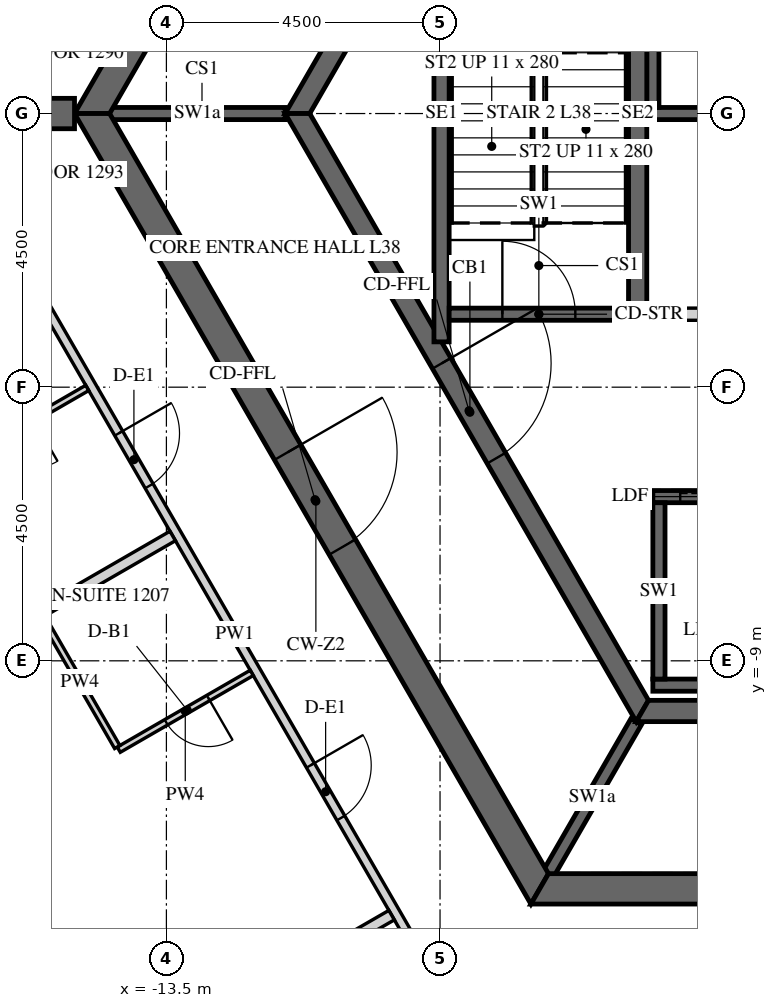
"""IFC4 building model, lengths in metres.
Left out: names, types, materials, properties, quantities, classifications, styles, units other than length and angle.
Written with IfcOpenShell. Run it as: python <this file> out.ifc"""

import sys

from ifc_helpers import new_model, si_unit, direction, frame, frame_2d, origin, place, context, subcontext, project, spatial, polyline, rectangle, outline, extrude, element, fill, save


model = new_model("IFC4")
c1 = context("Model", 3, precision=1e-05, world=origin(), true_north=direction((0.0, 1.0)))
c2 = subcontext(c1, "Body", "Model", "MODEL_VIEW")
j1 = project(units=[si_unit("LENGTHUNIT", "METRE"), si_unit("PLANEANGLEUNIT", "RADIAN")], contexts=[c1])
p1 = place(None, origin())
s1 = spatial("IfcSite", under=j1, at=p1, CompositionType="ELEMENT")
p2 = place(p1, origin())
s2 = spatial("IfcBuilding", under=s1, at=p2, CompositionType="ELEMENT")
p3 = place(p2, frame((0.0, 0.0, 164.4)))
s3 = spatial("IfcBuildingStorey", under=s2, at=p3, CompositionType="ELEMENT", Elevation=164.4)
p4 = place(p3, frame((-7.361, 12.75, -0.15), z_axis=(0.0, 0.0, 1.0), x_axis=(-0.50000571537, -0.866022103989, 0.0)))
e1 = element("IfcWall", 1, at=p4, inside=s3, PredefinedType="SHEAR", context=c2, shape_type="SweptSolid", body=[
    extrude(outline(polyline([(-0.144, -0.25), (14.867, -0.25), (14.578, 0.25), (0.144, 0.25), (-0.144, -0.25)])), origin(), (0.0, 0.0, 1.0), 3.9),
])
p5 = place(p4, frame((6.49, 0.0, 0.15)))
e2 = element("IfcOpeningElement", 2, at=p5, cuts=e1, PredefinedType="OPENING", context=c2, shape_type="SweptSolid", body=[
    extrude(rectangle(XDim=1.8, YDim=2.4, at=frame_2d((0.9, 1.2))), frame((0.0, 0.26, 0.0), z_axis=(0.0, -1.0, 0.0), x_axis=(1.0, 0.0, 0.0)), (0.0, 0.0, 1.0), 0.52),
])
p6 = place(p3, frame((-14.722, 0.0, -0.15), z_axis=(0.0, 0.0, 1.0), x_axis=(0.50000571537, -0.866022103989, 0.0)))
e3 = element("IfcWall", 3, at=p6, inside=s3, PredefinedType="SHEAR", context=c2, shape_type="SweptSolid", body=[
    extrude(outline(polyline([(-0.144, -0.25), (14.867, -0.25), (14.578, 0.25), (0.144, 0.25), (-0.144, -0.25)])), origin(), (0.0, 0.0, 1.0), 3.9),
])
p7 = place(p6, frame((6.432, 0.0, 0.15)))
e4 = element("IfcOpeningElement", 4, at=p7, cuts=e3, PredefinedType="OPENING", context=c2, shape_type="SweptSolid", body=[
    extrude(rectangle(XDim=1.8, YDim=2.4, at=frame_2d((0.9, 1.2))), frame((0.0, 0.26, 0.0), z_axis=(0.0, -1.0, 0.0), x_axis=(1.0, 0.0, 0.0)), (0.0, 0.0, 1.0), 0.52),
])
p8 = place(p3, frame((-7.361, -12.75, -0.15), z_axis=(0.0, 0.0, 1.0), x_axis=(1.0, 0.0, 0.0)))
e5 = element("IfcWall", 5, at=p8, inside=s3, PredefinedType="SHEAR", context=c2, shape_type="SweptSolid", body=[
    extrude(outline(polyline([(-0.144, -0.25), (14.866, -0.25), (14.578, 0.25), (0.144, 0.25), (-0.144, -0.25)])), origin(), (0.0, 0.0, 1.0), 3.9),
])
p9 = place(p8, frame((6.761, 0.0, 0.15)))
e6 = element("IfcOpeningElement", 6, at=p9, cuts=e5, PredefinedType="OPENING", context=c2, shape_type="SweptSolid", body=[
    extrude(rectangle(XDim=1.2, YDim=2.4, at=frame_2d((0.6, 1.2))), frame((0.0, 0.26, 0.0), z_axis=(0.0, -1.0, 0.0), x_axis=(1.0, 0.0, 0.0)), (0.0, 0.0, 1.0), 0.52),
])
p10 = place(p3, frame((-15.011, 0.0, -0.15), z_axis=(0.0, 0.0, 1.0), x_axis=(-1.0, 0.0, 0.0)))
e7 = element("IfcWall", 7, at=p10, inside=s3, PredefinedType="SHEAR", context=c2, shape_type="SweptSolid", body=[
    extrude(rectangle(XDim=15.424, YDim=0.5, at=frame_2d((7.712, 0.0))), origin(), (0.0, 0.0, 1.0), 3.9),
])
p11 = place(p10, frame((6.812, 0.0, 0.15)))
e8 = element("IfcOpeningElement", 8, at=p11, cuts=e7, PredefinedType="OPENING", context=c2, shape_type="SweptSolid", body=[
    extrude(rectangle(XDim=1.8, YDim=2.4, at=frame_2d((0.9, 1.2))), frame((0.0, 0.26, 0.0), z_axis=(0.0, -1.0, 0.0), x_axis=(1.0, 0.0, 0.0)), (0.0, 0.0, 1.0), 0.52),
])
p12 = place(p3, frame((-5.673, 9.825, -0.15), z_axis=(0.0, 0.0, 1.0), x_axis=(-0.499995046907, -0.866028263435, 0.0)))
e9 = element("IfcWall", 9, at=p12, inside=s3, PredefinedType="SHEAR", context=c2, shape_type="SweptSolid", body=[
    extrude(outline(polyline([(-0.101, -0.175), (11.446, -0.175), (11.244, 0.175), (0.101, 0.175), (-0.101, -0.175)])), origin(), (0.0, 0.0, 1.0), 3.9),
])
p13 = place(p12, frame((4.801, 0.0, 0.15)))
e10 = element("IfcOpeningElement", 10, at=p13, cuts=e9, PredefinedType="OPENING", context=c2, shape_type="SweptSolid", body=[
    extrude(rectangle(XDim=1.8, YDim=2.4, at=frame_2d((0.9, 1.2))), frame((0.0, 0.185, 0.0), z_axis=(0.0, -1.0, 0.0), x_axis=(1.0, 0.0, 0.0)), (0.0, 0.0, 1.0), 0.37),
])
p14 = place(p3, frame((-11.345, 0.0, -0.15), z_axis=(0.0, 0.0, 1.0), x_axis=(0.499995046907, -0.866028263435, 0.0)))
e11 = element("IfcWall", 11, at=p14, inside=s3, PredefinedType="SHEAR", context=c2, shape_type="SweptSolid", body=[
    extrude(outline(polyline([(-0.101, -0.175), (11.446, -0.175), (11.244, 0.175), (0.101, 0.175), (-0.101, -0.175)])), origin(), (0.0, 0.0, 1.0), 3.9),
])
p15 = place(p14, frame((4.744, 0.0, 0.15)))
e12 = element("IfcOpeningElement", 12, at=p15, cuts=e11, PredefinedType="OPENING", context=c2, shape_type="SweptSolid", body=[
    extrude(rectangle(XDim=1.8, YDim=2.4, at=frame_2d((0.9, 1.2))), frame((0.0, 0.185, 0.0), z_axis=(0.0, -1.0, 0.0), x_axis=(1.0, 0.0, 0.0)), (0.0, 0.0, 1.0), 0.37),
])
p16 = place(p3, frame((-5.673, -9.825, -0.15), z_axis=(0.0, 0.0, 1.0), x_axis=(1.0, 0.0, 0.0)))
e13 = element("IfcWall", 13, at=p16, inside=s3, PredefinedType="SHEAR", context=c2, shape_type="SweptSolid", body=[
    extrude(outline(polyline([(-0.101, -0.175), (11.446, -0.175), (11.244, 0.175), (0.101, 0.175), (-0.101, -0.175)])), origin(), (0.0, 0.0, 1.0), 3.9),
])
p17 = place(p3, frame((-5.6, 0.0, -0.25), z_axis=(0.0, 0.0, 1.0), x_axis=(1.0, 0.0, 0.0)))
e14 = element("IfcWall", 14, at=p17, inside=s3, PredefinedType="SHEAR", context=c2, shape_type="SweptSolid", body=[
    extrude(rectangle(XDim=11.2, YDim=0.2, at=frame_2d((5.6, 0.0))), origin(), (0.0, 0.0, 1.0), 3.9),
])
p18 = place(p3, frame((-5.5, 0.1, -0.25), z_axis=(0.0, 0.0, 1.0), x_axis=(0.0, 1.0, 0.0)))
e15 = element("IfcWall", 15, at=p18, inside=s3, PredefinedType="SHEAR", context=c2, shape_type="SweptSolid", body=[
    extrude(rectangle(XDim=3.1, YDim=0.2, at=frame_2d((1.55, 0.0))), origin(), (0.0, 0.0, 1.0), 3.9),
])
p19 = place(p3, frame((-5.5, -6.3, -0.25), z_axis=(0.0, 0.0, 1.0), x_axis=(1.0, 0.0, 0.0)))
e16 = element("IfcWall", 16, at=p19, inside=s3, PredefinedType="SHEAR", context=c2, shape_type="SweptSolid", body=[
    extrude(rectangle(XDim=9.2, YDim=0.2, at=frame_2d((4.6, 0.0))), origin(), (0.0, 0.0, 1.0), 3.9),
])
p20 = place(p19, frame((0.45, 0.0, 0.25)))
e17 = element("IfcOpeningElement", 17, at=p20, cuts=e16, PredefinedType="OPENING", context=c2, shape_type="SweptSolid", body=[
    extrude(rectangle(XDim=1.1, YDim=2.1, at=frame_2d((0.55, 1.05))), frame((0.0, 0.11, 0.0), z_axis=(0.0, -1.0, 0.0), x_axis=(1.0, 0.0, 0.0)), (0.0, 0.0, 1.0), 0.22),
])
p21 = place(p19, frame((2.25, 0.0, 0.25)))
e18 = element("IfcOpeningElement", 18, at=p21, cuts=e16, PredefinedType="OPENING", context=c2, shape_type="SweptSolid", body=[
    extrude(rectangle(XDim=1.1, YDim=2.1, at=frame_2d((0.55, 1.05))), frame((0.0, 0.11, 0.0), z_axis=(0.0, -1.0, 0.0), x_axis=(1.0, 0.0, 0.0)), (0.0, 0.0, 1.0), 0.22),
])
p22 = place(p19, frame((4.05, 0.0, 0.25)))
e19 = element("IfcOpeningElement", 19, at=p22, cuts=e16, PredefinedType="OPENING", context=c2, shape_type="SweptSolid", body=[
    extrude(rectangle(XDim=1.1, YDim=2.1, at=frame_2d((0.55, 1.05))), frame((0.0, 0.11, 0.0), z_axis=(0.0, -1.0, 0.0), x_axis=(1.0, 0.0, 0.0)), (0.0, 0.0, 1.0), 0.22),
])
p23 = place(p19, frame((5.85, 0.0, 0.25)))
e20 = element("IfcOpeningElement", 20, at=p23, cuts=e16, PredefinedType="OPENING", context=c2, shape_type="SweptSolid", body=[
    extrude(rectangle(XDim=1.1, YDim=2.1, at=frame_2d((0.55, 1.05))), frame((0.0, 0.11, 0.0), z_axis=(0.0, -1.0, 0.0), x_axis=(1.0, 0.0, 0.0)), (0.0, 0.0, 1.0), 0.22),
])
p24 = place(p19, frame((7.65, 0.0, 0.25)))
e21 = element("IfcOpeningElement", 21, at=p24, cuts=e16, PredefinedType="OPENING", context=c2, shape_type="SweptSolid", body=[
    extrude(rectangle(XDim=1.1, YDim=2.1, at=frame_2d((0.55, 1.05))), frame((0.0, 0.11, 0.0), z_axis=(0.0, -1.0, 0.0), x_axis=(1.0, 0.0, 0.0)), (0.0, 0.0, 1.0), 0.22),
])
p25 = place(p3, frame((-5.5, -9.4, -0.25), z_axis=(0.0, 0.0, 1.0), x_axis=(1.0, 0.0, 0.0)))
e22 = element("IfcWall", 22, at=p25, inside=s3, PredefinedType="SHEAR", context=c2, shape_type="SweptSolid", body=[
    extrude(rectangle(XDim=9.2, YDim=0.2, at=frame_2d((4.6, 0.0))), origin(), (0.0, 0.0, 1.0), 3.9),
])
p26 = place(p3, frame((-5.4, -9.3, -0.25), z_axis=(0.0, 0.0, 1.0), x_axis=(0.0, 1.0, 0.0)))
e23 = element("IfcWall", 23, at=p26, inside=s3, PredefinedType="SHEAR", context=c2, shape_type="SweptSolid", body=[
    extrude(rectangle(XDim=2.9, YDim=0.2, at=frame_2d((1.45, 0.0))), origin(), (0.0, 0.0, 1.0), 3.9),
])
p27 = place(p3, frame((-5.6, -3.3, 0.0), z_axis=(0.0, 0.0, 1.0), x_axis=(1.0, 0.0, 0.0)))
e24 = element("IfcWall", 24, at=p27, inside=s3, PredefinedType="PARTITIONING", context=c2, shape_type="SweptSolid", body=[
    extrude(rectangle(XDim=5.5, YDim=0.2, at=frame_2d((2.75, 0.0))), origin(), (0.0, 0.0, 1.0), 3.65),
])
p28 = place(p27, frame((2.3, 0.0, 0.0)))
e25 = element("IfcOpeningElement", 25, at=p28, cuts=e24, PredefinedType="OPENING", context=c2, shape_type="SweptSolid", body=[
    extrude(rectangle(XDim=0.9, YDim=2.1, at=frame_2d((0.45, 1.05))), frame((0.0, 0.11, 0.0), z_axis=(0.0, -1.0, 0.0), x_axis=(1.0, 0.0, 0.0)), (0.0, 0.0, 1.0), 0.22),
])
for number, where, z_axis, x_axis in (
    (26, (-11.547, 0.0, -0.15), (0.0, 0.0, 1.0), (-1.0, 0.0, 0.0)),
    (27, (-5.773, -10.0, -0.15), (0.0, 0.0, 1.0), (-0.5, -0.866, 0.0)),
):
    element("IfcWall", number, at=place(p3, frame(where, z_axis=z_axis, x_axis=x_axis)), inside=s3, PredefinedType="SHEAR", context=c2, shape_type="SweptSolid", body=[
        extrude(rectangle(XDim=2.887, YDim=0.2, at=frame_2d((1.443, 0.0))), origin(), (0.0, 0.0, 1.0), 3.9),
    ])
p29 = place(p3, frame((-5.75, -3.4, -0.25), z_axis=(0.0, 0.0, 1.0), x_axis=(0.0, 1.0, 0.0)))
e28 = element("IfcWall", 28, at=p29, inside=s3, PredefinedType="SHEAR", context=c2, shape_type="SweptSolid", body=[
    extrude(rectangle(XDim=6.8, YDim=0.3, at=frame_2d((3.4, 0.0))), origin(), (0.0, 0.0, 1.0), 3.9),
])
p30 = place(p3, frame((-8.975, -3.755, -0.25), z_axis=(0.0, 0.0, 1.0), x_axis=(0.0, 1.0, 0.0)))
e29 = element("IfcWall", 29, at=p30, inside=s3, PredefinedType="SHEAR", context=c2, shape_type="SweptSolid", body=[
    extrude(rectangle(XDim=7.51, YDim=0.25, at=frame_2d((3.755, 0.0))), origin(), (0.0, 0.0, 1.0), 3.9),
])
p31 = place(p3, frame((-8.85, -3.3, -0.25), z_axis=(0.0, 0.0, 1.0), x_axis=(1.0, 0.0, 0.0)))
e30 = element("IfcWall", 30, at=p31, inside=s3, PredefinedType="SHEAR", context=c2, shape_type="SweptSolid", body=[
    extrude(rectangle(XDim=2.95, YDim=0.2, at=frame_2d((1.475, 0.0))), origin(), (0.0, 0.0, 1.0), 3.9),
])
p32 = place(p31, frame((0.875, 0.0, 0.25)))
e31 = element("IfcOpeningElement", 31, at=p32, cuts=e30, PredefinedType="OPENING", context=c2, shape_type="SweptSolid", body=[
    extrude(rectangle(XDim=1.2, YDim=2.4, at=frame_2d((0.6, 1.2))), frame((0.0, 0.11, 0.0), z_axis=(0.0, -1.0, 0.0), x_axis=(1.0, 0.0, 0.0)), (0.0, 0.0, 1.0), 0.22),
])
p33 = place(p3, frame((-16.094, -2.125, 0.0), z_axis=(0.0, 0.0, 1.0), x_axis=(0.500010545262, -0.866019315389, 0.0)))
e32 = element("IfcWall", 32, at=p33, inside=s3, PredefinedType="PARTITIONING", context=c2, shape_type="SweptSolid", body=[
    extrude(rectangle(XDim=14.867, YDim=0.15, at=frame_2d((7.434, 0.0))), origin(), (0.0, 0.0, 1.0), 2.988),
])
p34 = place(p33, frame((3.619, 0.0, 0.0)))
e33 = element("IfcOpeningElement", 33, at=p34, cuts=e32, PredefinedType="OPENING", context=c2, shape_type="SweptSolid", body=[
    extrude(rectangle(XDim=1.0, YDim=2.1, at=frame_2d((0.5, 1.05))), frame((0.0, 0.085, 0.0), z_axis=(0.0, -1.0, 0.0), x_axis=(1.0, 0.0, 0.0)), (0.0, 0.0, 1.0), 0.17),
])
p35 = place(p33, frame((9.924, 0.0, 0.0)))
e34 = element("IfcOpeningElement", 34, at=p35, cuts=e32, PredefinedType="OPENING", context=c2, shape_type="SweptSolid", body=[
    extrude(rectangle(XDim=1.0, YDim=2.1, at=frame_2d((0.5, 1.05))), frame((0.0, 0.085, 0.0), z_axis=(0.0, -1.0, 0.0), x_axis=(1.0, 0.0, 0.0)), (0.0, 0.0, 1.0), 0.17),
])
p36 = place(p33, frame((13.717, 0.0, 0.0)))
e35 = element("IfcOpeningElement", 35, at=p36, cuts=e32, PredefinedType="OPENING", context=c2, shape_type="SweptSolid", body=[
    extrude(rectangle(XDim=1.0, YDim=2.1, at=frame_2d((0.5, 1.05))), frame((0.0, 0.085, 0.0), z_axis=(0.0, -1.0, 0.0), x_axis=(1.0, 0.0, 0.0)), (0.0, 0.0, 1.0), 0.17),
])
p37 = place(p3, frame((-14.802, -4.512, 0.0), z_axis=(0.0, 0.0, 1.0), x_axis=(-0.866025730634, -0.499999433879, 0.0)))
e36 = element("IfcWall", 36, at=p37, inside=s3, PredefinedType="PARTITIONING", context=c2, shape_type="SweptSolid", body=[
    extrude(rectangle(XDim=2.925, YDim=0.1, at=frame_2d((1.462, 0.0))), origin(), (0.0, 0.0, 1.0), 2.988),
])
p38 = place(p37, frame((1.025, 0.0, 0.0)))
e37 = element("IfcOpeningElement", 37, at=p38, cuts=e36, PredefinedType="OPENING", context=c2, shape_type="SweptSolid", body=[
    extrude(rectangle(XDim=0.8, YDim=2.1, at=frame_2d((0.4, 1.05))), frame((0.0, 0.06, 0.0), z_axis=(0.0, -1.0, 0.0), x_axis=(1.0, 0.0, 0.0)), (0.0, 0.0, 1.0), 0.12),
])
p39 = place(p3, frame((-24.114, -13.134, 0.0), z_axis=(0.0, 0.0, 1.0), x_axis=(0.866024931941, 0.500000817256, 0.0)))
e38 = element("IfcWall", 38, at=p39, inside=s3, PredefinedType="PARTITIONING", context=c2, shape_type="SweptSolid", body=[
    extrude(rectangle(XDim=12.375, YDim=0.18, at=frame_2d((6.188, 0.0))), origin(), (0.0, 0.0, 1.0), 2.988),
])
p40 = place(p3, frame((-12.096, -9.198, 0.0), z_axis=(0.0, 0.0, 1.0), x_axis=(-0.866039067339, -0.499976333282, 0.0)))
e39 = element("IfcWall", 39, at=p40, inside=s3, PredefinedType="PARTITIONING", context=c2, shape_type="SweptSolid", body=[
    extrude(rectangle(XDim=2.525, YDim=0.1, at=frame_2d((1.262, 0.0))), origin(), (0.0, 0.0, 1.0), 2.988),
])
p41 = place(p40, frame((0.825, 0.0, 0.0)))
e40 = element("IfcOpeningElement", 40, at=p41, cuts=e39, PredefinedType="OPENING", context=c2, shape_type="SweptSolid", body=[
    extrude(rectangle(XDim=0.8, YDim=2.1, at=frame_2d((0.4, 1.05))), frame((0.0, 0.06, 0.0), z_axis=(0.0, -1.0, 0.0), x_axis=(1.0, 0.0, 0.0)), (0.0, 0.0, 1.0), 0.12),
])
p42 = place(p3, frame((-14.308, -10.418, 0.0), z_axis=(0.0, 0.0, 1.0), x_axis=(-0.499960120811, 0.86604842682, 0.0)))
e41 = element("IfcWall", 41, at=p42, inside=s3, PredefinedType="PARTITIONING", context=c2, shape_type="SweptSolid", body=[
    extrude(rectangle(XDim=2.46, YDim=0.1, at=frame_2d((1.23, 0.0))), origin(), (0.0, 0.0, 1.0), 2.988),
])
p43 = place(p3, frame((-20.513, -19.37, 0.0), z_axis=(0.0, 0.0, 1.0), x_axis=(0.866024931941, 0.500000817256, 0.0)))
e42 = element("IfcWall", 42, at=p43, inside=s3, PredefinedType="PARTITIONING", context=c2, shape_type="SweptSolid", body=[
    extrude(rectangle(XDim=12.375, YDim=0.18, at=frame_2d((6.188, 0.0))), origin(), (0.0, 0.0, 1.0), 2.988),
])
p44 = place(p7, origin())
e43 = element("IfcDoor", 43, at=p44, inside=s3, OperationType="DOUBLE_DOOR_SINGLE_SWING", PredefinedType="DOOR", context=c2, shape_type="SweptSolid", body=[
    extrude(rectangle(XDim=1.8, YDim=2.4, at=frame_2d((0.9, 1.2))), frame((0.0, 0.025, 0.0), z_axis=(0.0, -1.0, 0.0), x_axis=(1.0, 0.0, 0.0)), (0.0, 0.0, 1.0), 0.05),
])
fill(e4, e43)
p45 = place(p15, origin())
e44 = element("IfcDoor", 44, at=p45, inside=s3, OperationType="DOUBLE_DOOR_SINGLE_SWING", PredefinedType="DOOR", context=c2, shape_type="SweptSolid", body=[
    extrude(rectangle(XDim=1.8, YDim=2.4, at=frame_2d((0.9, 1.2))), frame((0.0, 0.025, 0.0), z_axis=(0.0, -1.0, 0.0), x_axis=(1.0, 0.0, 0.0)), (0.0, 0.0, 1.0), 0.05),
])
fill(e12, e44)
p46 = place(p32, origin())
e45 = element("IfcDoor", 45, at=p46, inside=s3, OperationType="SINGLE_SWING_LEFT", PredefinedType="DOOR", context=c2, shape_type="SweptSolid", body=[
    extrude(rectangle(XDim=1.2, YDim=2.4, at=frame_2d((0.6, 1.2))), frame((0.0, 0.025, 0.0), z_axis=(0.0, -1.0, 0.0), x_axis=(1.0, 0.0, 0.0)), (0.0, 0.0, 1.0), 0.05),
])
fill(e31, e45)
p47 = place(p20, origin())
e46 = element("IfcDoor", 46, at=p47, inside=s3, OperationType="SLIDING_TO_LEFT", PredefinedType="DOOR", context=c2, shape_type="SweptSolid", body=[
    extrude(rectangle(XDim=1.1, YDim=2.1, at=frame_2d((0.55, 1.05))), frame((0.0, 0.025, 0.0), z_axis=(0.0, -1.0, 0.0), x_axis=(1.0, 0.0, 0.0)), (0.0, 0.0, 1.0), 0.05),
])
fill(e17, e46)
p48 = place(p34, origin())
e47 = element("IfcDoor", 47, at=p48, inside=s3, OperationType="SINGLE_SWING_RIGHT", PredefinedType="DOOR", context=c2, shape_type="SweptSolid", body=[
    extrude(rectangle(XDim=1.0, YDim=2.1, at=frame_2d((0.5, 1.05))), frame((0.0, 0.025, 0.0), z_axis=(0.0, -1.0, 0.0), x_axis=(1.0, 0.0, 0.0)), (0.0, 0.0, 1.0), 0.05),
])
fill(e33, e47)
p49 = place(p35, origin())
e48 = element("IfcDoor", 48, at=p49, inside=s3, OperationType="SINGLE_SWING_RIGHT", PredefinedType="DOOR", context=c2, shape_type="SweptSolid", body=[
    extrude(rectangle(XDim=1.0, YDim=2.1, at=frame_2d((0.5, 1.05))), frame((0.0, 0.025, 0.0), z_axis=(0.0, -1.0, 0.0), x_axis=(1.0, 0.0, 0.0)), (0.0, 0.0, 1.0), 0.05),
])
fill(e34, e48)
p50 = place(p41, origin())
e49 = element("IfcDoor", 49, at=p50, inside=s3, OperationType="SINGLE_SWING_RIGHT", PredefinedType="DOOR", context=c2, shape_type="SweptSolid", body=[
    extrude(rectangle(XDim=0.8, YDim=2.1, at=frame_2d((0.4, 1.05))), frame((0.0, 0.025, 0.0), z_axis=(0.0, -1.0, 0.0), x_axis=(1.0, 0.0, 0.0)), (0.0, 0.0, 1.0), 0.05),
])
fill(e40, e49)
save(model, sys.argv[1])
